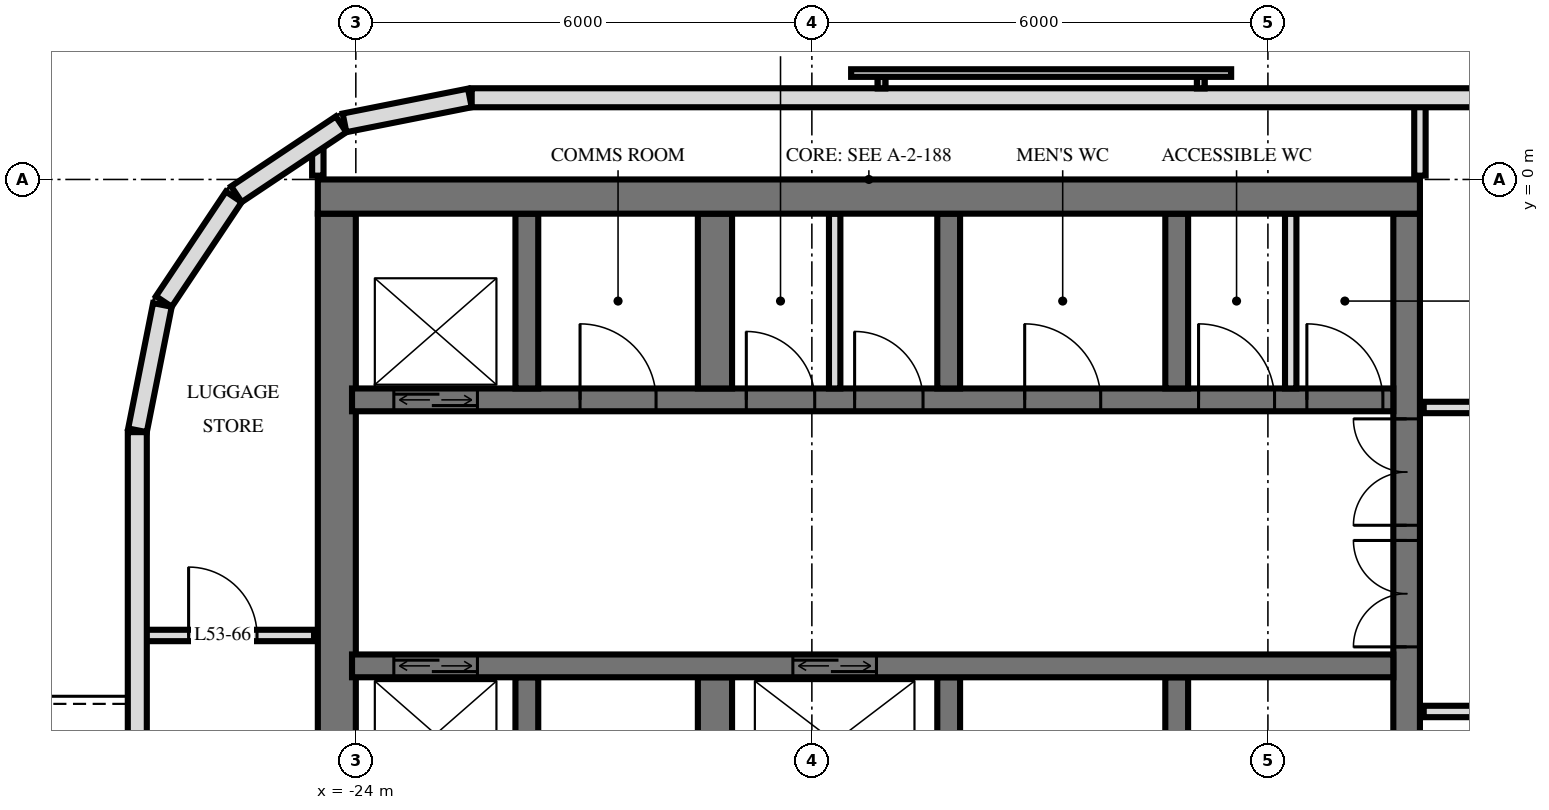
"""IFC4 building model, lengths in metres.
Left out: names, types, materials, properties, quantities, classifications, styles, units other than length and angle.
Written with IfcOpenShell. Run it as: python <this file> out.ifc"""

import sys

from ifc_helpers import new_model, si_unit, direction, frame, frame_2d, origin, place, context, subcontext, project, spatial, rectangle, extrude, element, fill, save


model = new_model("IFC4")
c1 = context("Model", 3, precision=1e-05, world=origin(), true_north=direction((0.0, 1.0)))
c2 = subcontext(c1, "Body", "Model", "MODEL_VIEW")
j1 = project(units=[si_unit("LENGTHUNIT", "METRE"), si_unit("PLANEANGLEUNIT", "RADIAN")], contexts=[c1])
p1 = place(None, origin())
s1 = spatial("IfcSite", under=j1, at=p1, CompositionType="ELEMENT")
p2 = place(p1, origin())
s2 = spatial("IfcBuilding", under=s1, at=p2, CompositionType="ELEMENT")
p3 = place(p2, frame((0.0, 0.0, 204.6)))
s3 = spatial("IfcBuildingStorey", under=s2, at=p3, CompositionType="ELEMENT", Elevation=204.6)
p4 = place(p3, frame((-24.5, -0.225, 0.0), z_axis=(0.0, 0.0, 1.0), x_axis=(1.0, 0.0, 0.0)))
e1 = element("IfcWall", 1, at=p4, inside=s3, PredefinedType="SHEAR", context=c2, shape_type="SweptSolid", body=[
    extrude(rectangle(XDim=14.5, YDim=0.45, at=frame_2d((7.25, 0.0))), origin(), (0.0, 0.0, 1.0), 3.5),
])
p5 = place(p3, frame((-10.175, -14.55, 0.0), z_axis=(0.0, 0.0, 1.0), x_axis=(0.0, 1.0, 0.0)))
e2 = element("IfcWall", 2, at=p5, inside=s3, PredefinedType="SHEAR", context=c2, shape_type="SweptSolid", body=[
    extrude(rectangle(XDim=14.1, YDim=0.35, at=frame_2d((7.05, 0.0))), origin(), (0.0, 0.0, 1.0), 3.5),
])
p6 = place(p5, frame((8.4, 0.0, 0.0)))
e3 = element("IfcOpeningElement", 3, at=p6, cuts=e2, PredefinedType="OPENING", context=c2, shape_type="SweptSolid", body=[
    extrude(rectangle(XDim=1.4, YDim=2.4, at=frame_2d((0.7, 1.2))), frame((0.0, 0.185, 0.0), z_axis=(0.0, -1.0, 0.0), x_axis=(1.0, 0.0, 0.0)), (0.0, 0.0, 1.0), 0.37),
])
p7 = place(p5, frame((10.0, 0.0, 0.0)))
e4 = element("IfcOpeningElement", 4, at=p7, cuts=e2, PredefinedType="OPENING", context=c2, shape_type="SweptSolid", body=[
    extrude(rectangle(XDim=1.4, YDim=2.4, at=frame_2d((0.7, 1.2))), frame((0.0, 0.185, 0.0), z_axis=(0.0, -1.0, 0.0), x_axis=(1.0, 0.0, 0.0)), (0.0, 0.0, 1.0), 0.37),
])
p8 = place(p5, frame((4.0, 0.0, 0.0)))
e5 = element("IfcOpeningElement", 5, at=p8, cuts=e2, PredefinedType="OPENING", context=c2, shape_type="SweptSolid", body=[
    extrude(rectangle(XDim=1.2, YDim=2.1, at=frame_2d((0.6, 1.05))), frame((0.0, 0.185, 0.0), z_axis=(0.0, -1.0, 0.0), x_axis=(1.0, 0.0, 0.0)), (0.0, 0.0, 1.0), 0.37),
])
p9 = place(p3, frame((-24.25, -14.55, 0.0), z_axis=(0.0, 0.0, 1.0), x_axis=(0.0, 1.0, 0.0)))
e6 = element("IfcWall", 6, at=p9, inside=s3, PredefinedType="SHEAR", context=c2, shape_type="SweptSolid", body=[
    extrude(rectangle(XDim=14.1, YDim=0.5, at=frame_2d((7.05, 0.0))), origin(), (0.0, 0.0, 1.0), 3.5),
])
p10 = place(p3, frame((-24.05, -2.9, 0.0), z_axis=(0.0, 0.0, 1.0), x_axis=(1.0, 0.0, 0.0)))
e7 = element("IfcWall", 7, at=p10, inside=s3, PredefinedType="SHEAR", context=c2, shape_type="SweptSolid", body=[
    extrude(rectangle(XDim=13.7, YDim=0.3, at=frame_2d((6.85, 0.0))), origin(), (0.0, 0.0, 1.0), 3.5),
])
p11 = place(p10, frame((0.55, 0.0, 0.0)))
e8 = element("IfcOpeningElement", 8, at=p11, cuts=e7, PredefinedType="OPENING", context=c2, shape_type="SweptSolid", body=[
    extrude(rectangle(XDim=1.1, YDim=2.1, at=frame_2d((0.55, 1.05))), frame((0.0, 0.16, 0.0), z_axis=(0.0, -1.0, 0.0), x_axis=(1.0, 0.0, 0.0)), (0.0, 0.0, 1.0), 0.32),
])
p12 = place(p10, frame((6.613, 0.0, 0.0)))
e9 = element("IfcOpeningElement", 9, at=p12, cuts=e7, PredefinedType="OPENING", context=c2, shape_type="SweptSolid", body=[
    extrude(rectangle(XDim=0.9, YDim=2.1, at=frame_2d((0.45, 1.05))), frame((0.0, 0.16, 0.0), z_axis=(0.0, -1.0, 0.0), x_axis=(1.0, 0.0, 0.0)), (0.0, 0.0, 1.0), 0.32),
])
p13 = place(p10, frame((5.188, 0.0, 0.0)))
e10 = element("IfcOpeningElement", 10, at=p13, cuts=e7, PredefinedType="OPENING", context=c2, shape_type="SweptSolid", body=[
    extrude(rectangle(XDim=0.9, YDim=2.1, at=frame_2d((0.45, 1.05))), frame((0.0, 0.16, 0.0), z_axis=(0.0, -1.0, 0.0), x_axis=(1.0, 0.0, 0.0)), (0.0, 0.0, 1.0), 0.32),
])
p14 = place(p10, frame((12.562, 0.0, 0.0)))
e11 = element("IfcOpeningElement", 11, at=p14, cuts=e7, PredefinedType="OPENING", context=c2, shape_type="SweptSolid", body=[
    extrude(rectangle(XDim=1.0, YDim=2.1, at=frame_2d((0.5, 1.05))), frame((0.0, 0.16, 0.0), z_axis=(0.0, -1.0, 0.0), x_axis=(1.0, 0.0, 0.0)), (0.0, 0.0, 1.0), 0.32),
])
p15 = place(p10, frame((11.137, 0.0, 0.0)))
e12 = element("IfcOpeningElement", 12, at=p15, cuts=e7, PredefinedType="OPENING", context=c2, shape_type="SweptSolid", body=[
    extrude(rectangle(XDim=1.0, YDim=2.1, at=frame_2d((0.5, 1.05))), frame((0.0, 0.16, 0.0), z_axis=(0.0, -1.0, 0.0), x_axis=(1.0, 0.0, 0.0)), (0.0, 0.0, 1.0), 0.32),
])
p16 = place(p10, frame((8.85, 0.0, 0.0)))
e13 = element("IfcOpeningElement", 13, at=p16, cuts=e7, PredefinedType="OPENING", context=c2, shape_type="SweptSolid", body=[
    extrude(rectangle(XDim=1.0, YDim=2.1, at=frame_2d((0.5, 1.05))), frame((0.0, 0.16, 0.0), z_axis=(0.0, -1.0, 0.0), x_axis=(1.0, 0.0, 0.0)), (0.0, 0.0, 1.0), 0.32),
])
p17 = place(p10, frame((3.0, 0.0, 0.0)))
e14 = element("IfcOpeningElement", 14, at=p17, cuts=e7, PredefinedType="OPENING", context=c2, shape_type="SweptSolid", body=[
    extrude(rectangle(XDim=1.0, YDim=2.1, at=frame_2d((0.5, 1.05))), frame((0.0, 0.16, 0.0), z_axis=(0.0, -1.0, 0.0), x_axis=(1.0, 0.0, 0.0)), (0.0, 0.0, 1.0), 0.32),
])
p18 = place(p3, frame((-24.05, -6.4, 0.0), z_axis=(0.0, 0.0, 1.0), x_axis=(1.0, 0.0, 0.0)))
e15 = element("IfcWall", 15, at=p18, inside=s3, PredefinedType="SHEAR", context=c2, shape_type="SweptSolid", body=[
    extrude(rectangle(XDim=13.7, YDim=0.3, at=frame_2d((6.85, 0.0))), origin(), (0.0, 0.0, 1.0), 3.5),
])
p19 = place(p18, frame((0.55, 0.0, 0.0)))
e16 = element("IfcOpeningElement", 16, at=p19, cuts=e15, PredefinedType="OPENING", context=c2, shape_type="SweptSolid", body=[
    extrude(rectangle(XDim=1.1, YDim=2.1, at=frame_2d((0.55, 1.05))), frame((0.0, 0.16, 0.0), z_axis=(0.0, -1.0, 0.0), x_axis=(1.0, 0.0, 0.0)), (0.0, 0.0, 1.0), 0.32),
])
p20 = place(p18, frame((5.8, 0.0, 0.0)))
e17 = element("IfcOpeningElement", 17, at=p20, cuts=e15, PredefinedType="OPENING", context=c2, shape_type="SweptSolid", body=[
    extrude(rectangle(XDim=1.1, YDim=2.1, at=frame_2d((0.55, 1.05))), frame((0.0, 0.16, 0.0), z_axis=(0.0, -1.0, 0.0), x_axis=(1.0, 0.0, 0.0)), (0.0, 0.0, 1.0), 0.32),
])
for number, where, z_axis, x_axis in (
    (18, (-13.2, -2.75, 0.0), (0.0, 0.0, 1.0), (0.0, 1.0, 0.0)),
    (19, (-13.2, -8.85, 0.0), (0.0, 0.0, 1.0), (0.0, 1.0, 0.0)),
    (20, (-16.2, -2.75, 0.0), (0.0, 0.0, 1.0), (0.0, 1.0, 0.0)),
    (21, (-16.2, -8.85, 0.0), (0.0, 0.0, 1.0), (0.0, 1.0, 0.0)),
):
    element("IfcWall", number, at=place(p3, frame(where, z_axis=z_axis, x_axis=x_axis)), inside=s3, PredefinedType="SHEAR", context=c2, shape_type="SweptSolid", body=[
        extrude(rectangle(XDim=2.3, YDim=0.3, at=frame_2d((1.15, 0.0))), origin(), (0.0, 0.0, 1.0), 3.5),
    ])
for number, where, z_axis, x_axis in (
    (22, (-19.275, -2.75, 0.0), (0.0, 0.0, 1.0), (0.0, 1.0, 0.0)),
    (23, (-19.275, -8.85, 0.0), (0.0, 0.0, 1.0), (0.0, 1.0, 0.0)),
):
    element("IfcWall", number, at=place(p3, frame(where, z_axis=z_axis, x_axis=x_axis)), inside=s3, PredefinedType="SHEAR", context=c2, shape_type="SweptSolid", body=[
        extrude(rectangle(XDim=2.3, YDim=0.45, at=frame_2d((1.15, 0.0))), origin(), (0.0, 0.0, 1.0), 3.5),
    ])
for number, where, z_axis, x_axis in (
    (24, (-21.75, -2.75, 0.0), (0.0, 0.0, 1.0), (0.0, 1.0, 0.0)),
    (25, (-21.75, -8.85, 0.0), (0.0, 0.0, 1.0), (0.0, 1.0, 0.0)),
):
    element("IfcWall", number, at=place(p3, frame(where, z_axis=z_axis, x_axis=x_axis)), inside=s3, PredefinedType="SHEAR", context=c2, shape_type="SweptSolid", body=[
        extrude(rectangle(XDim=2.3, YDim=0.3, at=frame_2d((1.15, 0.0))), origin(), (0.0, 0.0, 1.0), 3.5),
    ])
p21 = place(p3, frame((22.475, 1.075, 0.0), z_axis=(0.0, 0.0, 1.0), x_axis=(-1.0, 0.0, 0.0)))
e26 = element("IfcWall", 26, at=p21, inside=s3, PredefinedType="SOLIDWALL", context=c2, shape_type="SweptSolid", body=[
    extrude(rectangle(XDim=44.951, YDim=0.25, at=frame_2d((22.475, 0.0))), origin(), (0.0, 0.0, 1.0), 3.22),
])
p22 = place(p21, frame((18.275, 0.0, 0.9)))
e27 = element("IfcOpeningElement", 27, at=p22, cuts=e26, PredefinedType="OPENING", context=c2, shape_type="SweptSolid", body=[
    extrude(rectangle(XDim=2.4, YDim=1.5, at=frame_2d((1.2, 0.75))), frame((0.0, 0.135, 0.0), z_axis=(0.0, -1.0, 0.0), x_axis=(1.0, 0.0, 0.0)), (0.0, 0.0, 1.0), 0.27),
])
p23 = place(p21, frame((24.275, 0.0, 0.9)))
e28 = element("IfcOpeningElement", 28, at=p23, cuts=e26, PredefinedType="OPENING", context=c2, shape_type="SweptSolid", body=[
    extrude(rectangle(XDim=2.4, YDim=1.5, at=frame_2d((1.2, 0.75))), frame((0.0, 0.135, 0.0), z_axis=(0.0, -1.0, 0.0), x_axis=(1.0, 0.0, 0.0)), (0.0, 0.0, 1.0), 0.27),
])
p24 = place(p21, frame((27.275, 0.0, 0.9)))
e29 = element("IfcOpeningElement", 29, at=p24, cuts=e26, PredefinedType="OPENING", context=c2, shape_type="SweptSolid", body=[
    extrude(rectangle(XDim=2.4, YDim=1.5, at=frame_2d((1.2, 0.75))), frame((0.0, 0.135, 0.0), z_axis=(0.0, -1.0, 0.0), x_axis=(1.0, 0.0, 0.0)), (0.0, 0.0, 1.0), 0.27),
])
p25 = place(p3, frame((-22.5, 1.073, 0.0), z_axis=(0.0, 0.0, 1.0), x_axis=(-0.980803419081, -0.194999110559, 0.0)))
e30 = element("IfcWall", 30, at=p25, inside=s3, PredefinedType="SOLIDWALL", context=c2, shape_type="SweptSolid", body=[
    extrude(rectangle(XDim=1.681, YDim=0.25, at=frame_2d((0.841, 0.0))), origin(), (0.0, 0.0, 1.0), 3.22),
])
for number, where, z_axis, x_axis in (
    (31, (-24.194, 0.726, 0.0), (0.0, 0.0, 1.0), (-0.831, -0.556, 0.0)),
    (32, (-25.606, -0.229, 0.0), (0.0, 0.0, 1.0), (-0.556, -0.831, 0.0)),
):
    element("IfcWall", number, at=place(p3, frame(where, z_axis=z_axis, x_axis=x_axis)), inside=s3, PredefinedType="SOLIDWALL", context=c2, shape_type="SweptSolid", body=[
        extrude(rectangle(XDim=1.656, YDim=0.25, at=frame_2d((0.828, 0.0))), origin(), (0.0, 0.0, 1.0), 3.22),
    ])
p26 = place(p3, frame((-26.545, -1.651, 0.0), z_axis=(0.0, 0.0, 1.0), x_axis=(-0.194999110559, -0.980803419081, 0.0)))
e33 = element("IfcWall", 33, at=p26, inside=s3, PredefinedType="SOLIDWALL", context=c2, shape_type="SweptSolid", body=[
    extrude(rectangle(XDim=1.681, YDim=0.25, at=frame_2d((0.841, 0.0))), origin(), (0.0, 0.0, 1.0), 3.22),
])
p27 = place(p3, frame((-26.875, -3.325, 0.0), z_axis=(0.0, 0.0, 1.0), x_axis=(0.0, -1.0, 0.0)))
e34 = element("IfcWall", 34, at=p27, inside=s3, PredefinedType="SOLIDWALL", context=c2, shape_type="SweptSolid", body=[
    extrude(rectangle(XDim=21.551, YDim=0.25, at=frame_2d((10.775, 0.0))), origin(), (0.0, 0.0, 1.0), 3.22),
])
p28 = place(p27, frame((6.65, 0.0, 0.0)))
e35 = element("IfcOpeningElement", 35, at=p28, cuts=e34, PredefinedType="OPENING", context=c2, shape_type="SweptSolid", body=[
    extrude(rectangle(XDim=1.8, YDim=2.4, at=frame_2d((0.9, 1.2))), frame((0.0, 0.135, 0.0), z_axis=(0.0, -1.0, 0.0), x_axis=(1.0, 0.0, 0.0)), (0.0, 0.0, 1.0), 0.27),
])
p29 = place(p27, frame((12.275, 0.0, 0.9)))
e36 = element("IfcOpeningElement", 36, at=p29, cuts=e34, PredefinedType="OPENING", context=c2, shape_type="SweptSolid", body=[
    extrude(rectangle(XDim=1.2, YDim=1.5, at=frame_2d((0.6, 0.75))), frame((0.0, 0.135, 0.0), z_axis=(0.0, -1.0, 0.0), x_axis=(1.0, 0.0, 0.0)), (0.0, 0.0, 1.0), 0.27),
])
p30 = place(p27, frame((14.675, 0.0, 0.0)))
e37 = element("IfcOpeningElement", 37, at=p30, cuts=e34, PredefinedType="OPENING", context=c2, shape_type="SweptSolid", body=[
    extrude(rectangle(XDim=1.8, YDim=2.4, at=frame_2d((0.9, 1.2))), frame((0.0, 0.135, 0.0), z_axis=(0.0, -1.0, 0.0), x_axis=(1.0, 0.0, 0.0)), (0.0, 0.0, 1.0), 0.27),
])
p31 = place(p27, frame((18.875, 0.0, 0.0)))
e38 = element("IfcOpeningElement", 38, at=p31, cuts=e34, PredefinedType="OPENING", context=c2, shape_type="SweptSolid", body=[
    extrude(rectangle(XDim=1.8, YDim=2.4, at=frame_2d((0.9, 1.2))), frame((0.0, 0.135, 0.0), z_axis=(0.0, -1.0, 0.0), x_axis=(1.0, 0.0, 0.0)), (0.0, 0.0, 1.0), 0.27),
])
for number, where, z_axis, x_axis in (
    (39, (-17.7, -2.75, 0.0), (0.0, 0.0, 1.0), (0.0, 1.0, 0.0)),
    (40, (-11.7, -2.75, 0.0), (0.0, 0.0, 1.0), (0.0, 1.0, 0.0)),
):
    element("IfcWall", number, at=place(p3, frame(where, z_axis=z_axis, x_axis=x_axis)), inside=s3, PredefinedType="PARTITIONING", context=c2, shape_type="SweptSolid", body=[
        extrude(rectangle(XDim=2.3, YDim=0.15, at=frame_2d((1.15, 0.0))), origin(), (0.0, 0.0, 1.0), 3.2),
    ])
p32 = place(p3, frame((-10.0, 0.05, 0.0), z_axis=(0.0, 0.0, 1.0), x_axis=(0.0, 1.0, 0.0)))
e41 = element("IfcWall", 41, at=p32, inside=s3, PredefinedType="PARTITIONING", context=c2, shape_type="SweptSolid", body=[
    extrude(rectangle(XDim=0.97, YDim=0.15, at=frame_2d((0.485, 0.0))), origin(), (0.0, 0.0, 1.0), 3.22),
])
p33 = place(p3, frame((-24.5, 0.05, 0.0), z_axis=(0.0, 0.0, 1.0), x_axis=(0.0, 1.0, 0.0)))
e42 = element("IfcWall", 42, at=p33, inside=s3, PredefinedType="PARTITIONING", context=c2, shape_type="SweptSolid", body=[
    extrude(rectangle(XDim=0.405, YDim=0.15, at=frame_2d((0.203, 0.0))), origin(), (0.0, 0.0, 1.0), 3.22),
])
p34 = place(p3, frame((-9.95, -7.0, 0.0), z_axis=(0.0, 0.0, 1.0), x_axis=(1.0, 0.0, 0.0)))
e43 = element("IfcWall", 43, at=p34, inside=s3, PredefinedType="PARTITIONING", context=c2, shape_type="SweptSolid", body=[
    extrude(rectangle(XDim=19.9, YDim=0.15, at=frame_2d((9.95, 0.0))), origin(), (0.0, 0.0, 1.0), 3.22),
])
p35 = place(p34, frame((9.45, 0.0, 0.0)))
e44 = element("IfcOpeningElement", 44, at=p35, cuts=e43, PredefinedType="OPENING", context=c2, shape_type="SweptSolid", body=[
    extrude(rectangle(XDim=1.0, YDim=2.1, at=frame_2d((0.5, 1.05))), frame((0.0, 0.085, 0.0), z_axis=(0.0, -1.0, 0.0), x_axis=(1.0, 0.0, 0.0)), (0.0, 0.0, 1.0), 0.17),
])
p36 = place(p34, frame((3.45, 0.0, 0.0)))
e45 = element("IfcOpeningElement", 45, at=p36, cuts=e43, PredefinedType="OPENING", context=c2, shape_type="SweptSolid", body=[
    extrude(rectangle(XDim=1.0, YDim=2.1, at=frame_2d((0.5, 1.05))), frame((0.0, 0.085, 0.0), z_axis=(0.0, -1.0, 0.0), x_axis=(1.0, 0.0, 0.0)), (0.0, 0.0, 1.0), 0.17),
])
p37 = place(p3, frame((-26.82, -6.0, 0.0), z_axis=(0.0, 0.0, 1.0), x_axis=(1.0, 0.0, 0.0)))
e46 = element("IfcWall", 46, at=p37, inside=s3, PredefinedType="PARTITIONING", context=c2, shape_type="SweptSolid", body=[
    extrude(rectangle(XDim=2.27, YDim=0.15, at=frame_2d((1.135, 0.0))), origin(), (0.0, 0.0, 1.0), 3.22),
])
p38 = place(p37, frame((0.62, 0.0, 0.0)))
e47 = element("IfcOpeningElement", 47, at=p38, cuts=e46, PredefinedType="OPENING", context=c2, shape_type="SweptSolid", body=[
    extrude(rectangle(XDim=0.9, YDim=2.1, at=frame_2d((0.45, 1.05))), frame((0.0, 0.085, 0.0), z_axis=(0.0, -1.0, 0.0), x_axis=(1.0, 0.0, 0.0)), (0.0, 0.0, 1.0), 0.17),
])
p39 = place(p3, frame((-9.95, -3.0, 0.0), z_axis=(0.0, 0.0, 1.0), x_axis=(1.0, 0.0, 0.0)))
e48 = element("IfcWall", 48, at=p39, inside=s3, PredefinedType="PARTITIONING", context=c2, shape_type="SweptSolid", body=[
    extrude(rectangle(XDim=19.9, YDim=0.15, at=frame_2d((9.95, 0.0))), origin(), (0.0, 0.0, 1.0), 3.22),
])
p40 = place(p39, frame((4.2, 0.0, 0.0)))
e49 = element("IfcOpeningElement", 49, at=p40, cuts=e48, PredefinedType="OPENING", context=c2, shape_type="SweptSolid", body=[
    extrude(rectangle(XDim=1.0, YDim=2.1, at=frame_2d((0.5, 1.05))), frame((0.0, 0.085, 0.0), z_axis=(0.0, -1.0, 0.0), x_axis=(1.0, 0.0, 0.0)), (0.0, 0.0, 1.0), 0.17),
])
p41 = place(p39, frame((11.45, 0.0, 0.0)))
e50 = element("IfcOpeningElement", 50, at=p41, cuts=e48, PredefinedType="OPENING", context=c2, shape_type="SweptSolid", body=[
    extrude(rectangle(XDim=1.0, YDim=2.1, at=frame_2d((0.5, 1.05))), frame((0.0, 0.085, 0.0), z_axis=(0.0, -1.0, 0.0), x_axis=(1.0, 0.0, 0.0)), (0.0, 0.0, 1.0), 0.17),
])
p42 = place(p39, frame((15.45, 0.0, 0.0)))
e51 = element("IfcOpeningElement", 51, at=p42, cuts=e48, PredefinedType="OPENING", context=c2, shape_type="SweptSolid", body=[
    extrude(rectangle(XDim=1.0, YDim=2.1, at=frame_2d((0.5, 1.05))), frame((0.0, 0.085, 0.0), z_axis=(0.0, -1.0, 0.0), x_axis=(1.0, 0.0, 0.0)), (0.0, 0.0, 1.0), 0.17),
])
p43 = place(p39, frame((18.2, 0.0, 0.0)))
e52 = element("IfcOpeningElement", 52, at=p43, cuts=e48, PredefinedType="OPENING", context=c2, shape_type="SweptSolid", body=[
    extrude(rectangle(XDim=1.0, YDim=2.1, at=frame_2d((0.5, 1.05))), frame((0.0, 0.085, 0.0), z_axis=(0.0, -1.0, 0.0), x_axis=(1.0, 0.0, 0.0)), (0.0, 0.0, 1.0), 0.17),
])
p44 = place(p11, origin())
e53 = element("IfcDoor", 53, at=p44, inside=s3, OperationType="DOUBLE_DOOR_SLIDING", PredefinedType="USERDEFINED", context=c2, shape_type="SweptSolid", body=[
    extrude(rectangle(XDim=1.1, YDim=2.1, at=frame_2d((0.55, 1.05))), frame((0.0, 0.025, 0.0), z_axis=(0.0, -1.0, 0.0), x_axis=(1.0, 0.0, 0.0)), (0.0, 0.0, 1.0), 0.05),
])
fill(e8, e53)
p45 = place(p19, origin())
e54 = element("IfcDoor", 54, at=p45, inside=s3, OperationType="DOUBLE_DOOR_SLIDING", PredefinedType="USERDEFINED", context=c2, shape_type="SweptSolid", body=[
    extrude(rectangle(XDim=1.1, YDim=2.1, at=frame_2d((0.55, 1.05))), frame((0.0, 0.025, 0.0), z_axis=(0.0, -1.0, 0.0), x_axis=(1.0, 0.0, 0.0)), (0.0, 0.0, 1.0), 0.05),
])
fill(e16, e54)
p46 = place(p20, origin())
e55 = element("IfcDoor", 55, at=p46, inside=s3, OperationType="DOUBLE_DOOR_SLIDING", PredefinedType="USERDEFINED", context=c2, shape_type="SweptSolid", body=[
    extrude(rectangle(XDim=1.1, YDim=2.1, at=frame_2d((0.55, 1.05))), frame((0.0, 0.025, 0.0), z_axis=(0.0, -1.0, 0.0), x_axis=(1.0, 0.0, 0.0)), (0.0, 0.0, 1.0), 0.05),
])
fill(e17, e55)
p47 = place(p6, origin())
e56 = element("IfcDoor", 56, at=p47, inside=s3, OperationType="DOUBLE_DOOR_SINGLE_SWING", PredefinedType="DOOR", context=c2, shape_type="SweptSolid", body=[
    extrude(rectangle(XDim=1.4, YDim=2.4, at=frame_2d((0.7, 1.2))), frame((0.0, 0.025, 0.0), z_axis=(0.0, -1.0, 0.0), x_axis=(1.0, 0.0, 0.0)), (0.0, 0.0, 1.0), 0.05),
])
fill(e3, e56)
p48 = place(p7, origin())
e57 = element("IfcDoor", 57, at=p48, inside=s3, OperationType="DOUBLE_DOOR_SINGLE_SWING", PredefinedType="DOOR", context=c2, shape_type="SweptSolid", body=[
    extrude(rectangle(XDim=1.4, YDim=2.4, at=frame_2d((0.7, 1.2))), frame((0.0, 0.025, 0.0), z_axis=(0.0, -1.0, 0.0), x_axis=(1.0, 0.0, 0.0)), (0.0, 0.0, 1.0), 0.05),
])
fill(e4, e57)
p49 = place(p12, origin())
e58 = element("IfcDoor", 58, at=p49, inside=s3, OperationType="SINGLE_SWING_RIGHT", PredefinedType="DOOR", context=c2, shape_type="SweptSolid", body=[
    extrude(rectangle(XDim=0.9, YDim=2.1, at=frame_2d((0.45, 1.05))), frame((0.0, 0.025, 0.0), z_axis=(0.0, -1.0, 0.0), x_axis=(1.0, 0.0, 0.0)), (0.0, 0.0, 1.0), 0.05),
])
fill(e9, e58)
p50 = place(p13, origin())
e59 = element("IfcDoor", 59, at=p50, inside=s3, OperationType="SINGLE_SWING_RIGHT", PredefinedType="DOOR", context=c2, shape_type="SweptSolid", body=[
    extrude(rectangle(XDim=0.9, YDim=2.1, at=frame_2d((0.45, 1.05))), frame((0.0, 0.025, 0.0), z_axis=(0.0, -1.0, 0.0), x_axis=(1.0, 0.0, 0.0)), (0.0, 0.0, 1.0), 0.05),
])
fill(e10, e59)
p51 = place(p14, origin())
e60 = element("IfcDoor", 60, at=p51, inside=s3, OperationType="SINGLE_SWING_RIGHT", PredefinedType="DOOR", context=c2, shape_type="SweptSolid", body=[
    extrude(rectangle(XDim=1.0, YDim=2.1, at=frame_2d((0.5, 1.05))), frame((0.0, 0.025, 0.0), z_axis=(0.0, -1.0, 0.0), x_axis=(1.0, 0.0, 0.0)), (0.0, 0.0, 1.0), 0.05),
])
fill(e11, e60)
p52 = place(p15, origin())
e61 = element("IfcDoor", 61, at=p52, inside=s3, OperationType="SINGLE_SWING_RIGHT", PredefinedType="DOOR", context=c2, shape_type="SweptSolid", body=[
    extrude(rectangle(XDim=1.0, YDim=2.1, at=frame_2d((0.5, 1.05))), frame((0.0, 0.025, 0.0), z_axis=(0.0, -1.0, 0.0), x_axis=(1.0, 0.0, 0.0)), (0.0, 0.0, 1.0), 0.05),
])
fill(e12, e61)
p53 = place(p16, origin())
e62 = element("IfcDoor", 62, at=p53, inside=s3, OperationType="SINGLE_SWING_RIGHT", PredefinedType="DOOR", context=c2, shape_type="SweptSolid", body=[
    extrude(rectangle(XDim=1.0, YDim=2.1, at=frame_2d((0.5, 1.05))), frame((0.0, 0.025, 0.0), z_axis=(0.0, -1.0, 0.0), x_axis=(1.0, 0.0, 0.0)), (0.0, 0.0, 1.0), 0.05),
])
fill(e13, e62)
p54 = place(p17, origin())
e63 = element("IfcDoor", 63, at=p54, inside=s3, OperationType="SINGLE_SWING_RIGHT", PredefinedType="DOOR", context=c2, shape_type="SweptSolid", body=[
    extrude(rectangle(XDim=1.0, YDim=2.1, at=frame_2d((0.5, 1.05))), frame((0.0, 0.025, 0.0), z_axis=(0.0, -1.0, 0.0), x_axis=(1.0, 0.0, 0.0)), (0.0, 0.0, 1.0), 0.05),
])
fill(e14, e63)
p55 = place(p38, origin())
e64 = element("IfcDoor", 64, at=p55, inside=s3, OperationType="SINGLE_SWING_RIGHT", PredefinedType="DOOR", context=c2, shape_type="SweptSolid", body=[
    extrude(rectangle(XDim=0.9, YDim=2.1, at=frame_2d((0.45, 1.05))), frame((0.0, 0.025, 0.0), z_axis=(0.0, -1.0, 0.0), x_axis=(1.0, 0.0, 0.0)), (0.0, 0.0, 1.0), 0.05),
])
fill(e47, e64)
save(model, sys.argv[1])
